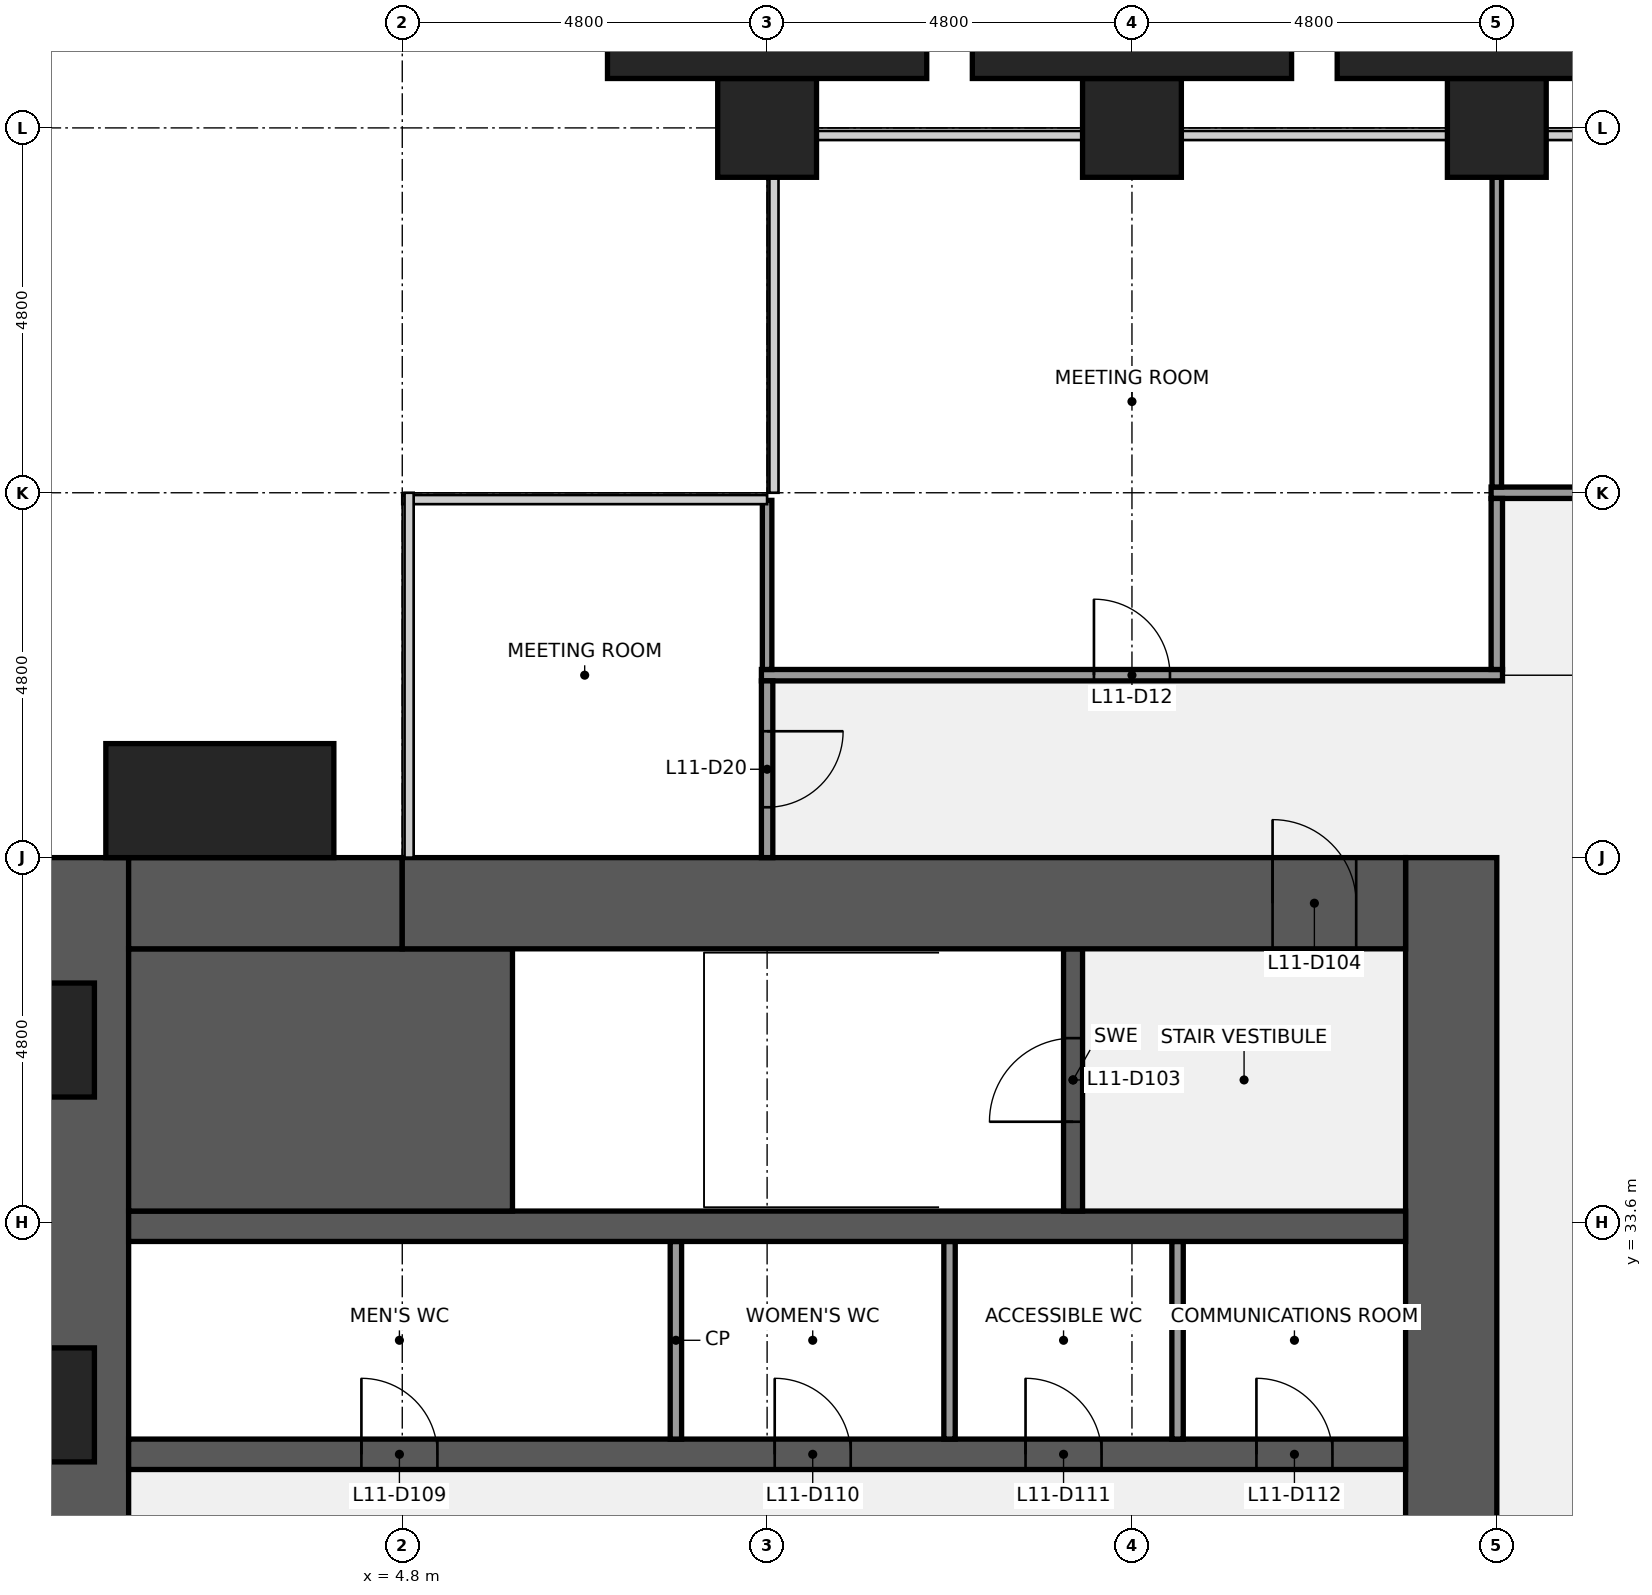
"""IFC4 building model, lengths in metres.
Left out: names, types, materials, properties, quantities, classifications, styles, units other than length and angle.
Written with IfcOpenShell. Run it as: python <this file> out.ifc"""

import sys

from ifc_helpers import new_model, si_unit, direction, frame, frame_2d, origin, origin_2d, place, context, subcontext, project, spatial, rectangle, extrude, element, fill, save


model = new_model("IFC4")
c1 = context("Model", 3, precision=1e-05, world=origin(), true_north=direction((0.0, 1.0)))
c2 = subcontext(c1, "Body", "Model", "MODEL_VIEW")
j1 = project(units=[si_unit("LENGTHUNIT", "METRE"), si_unit("PLANEANGLEUNIT", "RADIAN")], contexts=[c1])
p1 = place(None, origin())
s1 = spatial("IfcSite", under=j1, at=p1, CompositionType="ELEMENT")
p2 = place(p1, origin())
s2 = spatial("IfcBuilding", under=s1, at=p2, CompositionType="ELEMENT")
p3 = place(p2, frame((0.0, 0.0, 55.0)))
s3 = spatial("IfcBuildingStorey", under=s2, at=p3, CompositionType="ELEMENT", Elevation=55.0)
for number, where, z_axis, x_axis in (
    (1, (9.6, 48.0, 0.0), (0.0, 0.0, 1.0), (1.0, 0.0, 0.0)),
    (2, (14.4, 48.0, 0.0), (0.0, 0.0, 1.0), (1.0, 0.0, 0.0)),
    (3, (19.2, 48.0, 0.0), (0.0, 0.0, 1.0), (1.0, 0.0, 0.0)),
):
    element("IfcColumn", number, at=place(p3, frame(where, z_axis=z_axis, x_axis=x_axis)), inside=s3, PredefinedType="COLUMN", context=c2, shape_type="SweptSolid", body=[
        extrude(rectangle(XDim=1.3, YDim=1.3, at=origin_2d()), origin(), (0.0, 0.0, 1.0), 4.0),
    ])
p4 = place(p3, frame((0.6, 9.6, 0.0), z_axis=(0.0, 0.0, 1.0), x_axis=(0.0, 1.0, 0.0)))
e4 = element("IfcWall", 4, at=p4, inside=s3, PredefinedType="SHEAR", context=c2, shape_type="SweptSolid", body=[
    extrude(rectangle(XDim=28.8, YDim=1.2, at=frame_2d((14.4, 0.0))), origin(), (0.0, 0.0, 1.0), 3.84),
])
p5 = place(p4, frame((8.85, 0.0, 0.9)))
e5 = element("IfcOpeningElement", 5, at=p5, cuts=e4, PredefinedType="OPENING", context=c2, shape_type="SweptSolid", body=[
    extrude(rectangle(XDim=1.5, YDim=1.5, at=frame_2d((0.75, 0.75))), frame((0.0, 0.61, 0.0), z_axis=(0.0, -1.0, 0.0), x_axis=(1.0, 0.0, 0.0)), (0.0, 0.0, 1.0), 1.22),
])
p6 = place(p4, frame((18.45, 0.0, 0.9)))
e6 = element("IfcOpeningElement", 6, at=p6, cuts=e4, PredefinedType="OPENING", context=c2, shape_type="SweptSolid", body=[
    extrude(rectangle(XDim=1.5, YDim=1.5, at=frame_2d((0.75, 0.75))), frame((0.0, 0.61, 0.0), z_axis=(0.0, -1.0, 0.0), x_axis=(1.0, 0.0, 0.0)), (0.0, 0.0, 1.0), 1.22),
])
p7 = place(p3, frame((18.6, 38.4, 0.0), z_axis=(0.0, 0.0, 1.0), x_axis=(0.0, -1.0, 0.0)))
e7 = element("IfcWall", 7, at=p7, inside=s3, PredefinedType="SHEAR", context=c2, shape_type="SweptSolid", body=[
    extrude(rectangle(XDim=28.8, YDim=1.2, at=frame_2d((14.4, 0.0))), origin(), (0.0, 0.0, 1.0), 3.84),
])
p8 = place(p7, frame((18.3, 0.0, 0.0)))
e8 = element("IfcOpeningElement", 8, at=p8, cuts=e7, PredefinedType="OPENING", context=c2, shape_type="SweptSolid", body=[
    extrude(rectangle(XDim=1.8, YDim=2.1, at=frame_2d((0.9, 1.05))), frame((0.0, 0.61, 0.0), z_axis=(0.0, -1.0, 0.0), x_axis=(1.0, 0.0, 0.0)), (0.0, 0.0, 1.0), 1.22),
])
p9 = place(p7, frame((8.7, 0.0, 0.0)))
e9 = element("IfcOpeningElement", 9, at=p9, cuts=e7, PredefinedType="OPENING", context=c2, shape_type="SweptSolid", body=[
    extrude(rectangle(XDim=1.8, YDim=2.1, at=frame_2d((0.9, 1.05))), frame((0.0, 0.61, 0.0), z_axis=(0.0, -1.0, 0.0), x_axis=(1.0, 0.0, 0.0)), (0.0, 0.0, 1.0), 1.22),
])
p10 = place(p3, frame((1.2, 30.55, 0.0), z_axis=(0.0, 0.0, 1.0), x_axis=(1.0, 0.0, 0.0)))
e10 = element("IfcWall", 10, at=p10, inside=s3, PredefinedType="SHEAR", context=c2, shape_type="SweptSolid", body=[
    extrude(rectangle(XDim=16.8, YDim=0.4, at=frame_2d((8.4, 0.0))), origin(), (0.0, 0.0, 1.0), 3.84),
])
p11 = place(p10, frame((3.062, 0.0, 0.0)))
e11 = element("IfcOpeningElement", 11, at=p11, cuts=e10, PredefinedType="OPENING", context=c2, shape_type="SweptSolid", body=[
    extrude(rectangle(XDim=1.0, YDim=2.1, at=frame_2d((0.5, 1.05))), frame((0.0, 0.21, 0.0), z_axis=(0.0, -1.0, 0.0), x_axis=(1.0, 0.0, 0.0)), (0.0, 0.0, 1.0), 0.42),
])
p12 = place(p10, frame((8.5, 0.0, 0.0)))
e12 = element("IfcOpeningElement", 12, at=p12, cuts=e10, PredefinedType="OPENING", context=c2, shape_type="SweptSolid", body=[
    extrude(rectangle(XDim=1.0, YDim=2.1, at=frame_2d((0.5, 1.05))), frame((0.0, 0.21, 0.0), z_axis=(0.0, -1.0, 0.0), x_axis=(1.0, 0.0, 0.0)), (0.0, 0.0, 1.0), 0.42),
])
p13 = place(p10, frame((11.8, 0.0, 0.0)))
e13 = element("IfcOpeningElement", 13, at=p13, cuts=e10, PredefinedType="OPENING", context=c2, shape_type="SweptSolid", body=[
    extrude(rectangle(XDim=1.0, YDim=2.1, at=frame_2d((0.5, 1.05))), frame((0.0, 0.21, 0.0), z_axis=(0.0, -1.0, 0.0), x_axis=(1.0, 0.0, 0.0)), (0.0, 0.0, 1.0), 0.42),
])
p14 = place(p10, frame((14.837, 0.0, 0.0)))
e14 = element("IfcOpeningElement", 14, at=p14, cuts=e10, PredefinedType="OPENING", context=c2, shape_type="SweptSolid", body=[
    extrude(rectangle(XDim=1.0, YDim=2.1, at=frame_2d((0.5, 1.05))), frame((0.0, 0.21, 0.0), z_axis=(0.0, -1.0, 0.0), x_axis=(1.0, 0.0, 0.0)), (0.0, 0.0, 1.0), 0.42),
])
for number, where, z_axis, x_axis in (
    (15, (8.4, 30.75, 0.0), (0.0, 0.0, 1.0), (0.0, 1.0, 0.0)),
    (16, (12.0, 30.75, 0.0), (0.0, 0.0, 1.0), (0.0, 1.0, 0.0)),
    (17, (15.0, 30.75, 0.0), (0.0, 0.0, 1.0), (0.0, 1.0, 0.0)),
):
    element("IfcWall", number, at=place(p3, frame(where, z_axis=z_axis, x_axis=x_axis)), inside=s3, PredefinedType="PARTITIONING", context=c2, shape_type="SweptSolid", body=[
        extrude(rectangle(XDim=2.6, YDim=0.15, at=frame_2d((1.3, 0.0))), origin(), (0.0, 0.0, 1.0), 3.84),
    ])
p15 = place(p3, frame((1.2, 33.55, 0.0), z_axis=(0.0, 0.0, 1.0), x_axis=(1.0, 0.0, 0.0)))
e18 = element("IfcWall", 18, at=p15, inside=s3, PredefinedType="SHEAR", context=c2, shape_type="SweptSolid", body=[
    extrude(rectangle(XDim=16.8, YDim=0.4, at=frame_2d((8.4, 0.0))), origin(), (0.0, 0.0, 1.0), 3.84),
])
p16 = place(p3, frame((1.2, 35.475, 0.0), z_axis=(0.0, 0.0, 1.0), x_axis=(1.0, 0.0, 0.0)))
e19 = element("IfcWall", 19, at=p16, inside=s3, PredefinedType="SHEAR", context=c2, shape_type="SweptSolid", body=[
    extrude(rectangle(XDim=5.05, YDim=3.45, at=frame_2d((2.525, 0.0))), origin(), (0.0, 0.0, 1.0), 3.84),
])
p17 = place(p3, frame((13.625, 33.75, 0.0), z_axis=(0.0, 0.0, 1.0), x_axis=(0.0, 1.0, 0.0)))
e20 = element("IfcWall", 20, at=p17, inside=s3, PredefinedType="SHEAR", context=c2, shape_type="SweptSolid", body=[
    extrude(rectangle(XDim=3.45, YDim=0.25, at=frame_2d((1.725, 0.0))), origin(), (0.0, 0.0, 1.0), 3.84),
])
p18 = place(p17, frame((1.175, 0.0, 0.0)))
e21 = element("IfcOpeningElement", 21, at=p18, cuts=e20, PredefinedType="OPENING", context=c2, shape_type="SweptSolid", body=[
    extrude(rectangle(XDim=1.1, YDim=2.1, at=frame_2d((0.55, 1.05))), frame((0.0, 0.135, 0.0), z_axis=(0.0, -1.0, 0.0), x_axis=(1.0, 0.0, 0.0)), (0.0, 0.0, 1.0), 0.27),
])
p19 = place(p3, frame((1.2, 37.8, 0.0), z_axis=(0.0, 0.0, 1.0), x_axis=(1.0, 0.0, 0.0)))
e22 = element("IfcWall", 22, at=p19, inside=s3, PredefinedType="SHEAR", context=c2, shape_type="SweptSolid", body=[
    extrude(rectangle(XDim=3.6, YDim=1.2, at=frame_2d((1.8, 0.0))), origin(), (0.0, 0.0, 1.0), 3.84),
])
p20 = place(p3, frame((4.8, 37.8, 0.0), z_axis=(0.0, 0.0, 1.0), x_axis=(1.0, 0.0, 0.0)))
e23 = element("IfcWall", 23, at=p20, inside=s3, PredefinedType="SHEAR", context=c2, shape_type="SweptSolid", body=[
    extrude(rectangle(XDim=13.2, YDim=1.2, at=frame_2d((6.6, 0.0))), origin(), (0.0, 0.0, 1.0), 3.84),
])
p21 = place(p20, frame((11.45, 0.0, 0.0)))
e24 = element("IfcOpeningElement", 24, at=p21, cuts=e23, PredefinedType="OPENING", context=c2, shape_type="SweptSolid", body=[
    extrude(rectangle(XDim=1.1, YDim=2.1, at=frame_2d((0.55, 1.05))), frame((0.0, 0.61, 0.0), z_axis=(0.0, -1.0, 0.0), x_axis=(1.0, 0.0, 0.0)), (0.0, 0.0, 1.0), 1.22),
])
p22 = place(p3, frame((9.525, 40.8, 0.0), z_axis=(0.0, 0.0, 1.0), x_axis=(1.0, 0.0, 0.0)))
e25 = element("IfcWall", 25, at=p22, inside=s3, PredefinedType="PARTITIONING", context=c2, shape_type="SweptSolid", body=[
    extrude(rectangle(XDim=9.75, YDim=0.15, at=frame_2d((4.875, 0.0))), origin(), (0.0, 0.0, 1.0), 2.849),
])
p23 = place(p22, frame((4.375, 0.0, 0.0)))
e26 = element("IfcOpeningElement", 26, at=p23, cuts=e25, PredefinedType="OPENING", context=c2, shape_type="SweptSolid", body=[
    extrude(rectangle(XDim=1.0, YDim=2.1, at=frame_2d((0.5, 1.05))), frame((0.0, 0.085, 0.0), z_axis=(0.0, -1.0, 0.0), x_axis=(1.0, 0.0, 0.0)), (0.0, 0.0, 1.0), 0.17),
])
p24 = place(p3, frame((19.125, 43.2, 0.0), z_axis=(0.0, 0.0, 1.0), x_axis=(1.0, 0.0, 0.0)))
e27 = element("IfcWall", 27, at=p24, inside=s3, PredefinedType="PARTITIONING", context=c2, shape_type="SweptSolid", body=[
    extrude(rectangle(XDim=19.35, YDim=0.15, at=frame_2d((9.675, 0.0))), origin(), (0.0, 0.0, 1.0), 2.849),
])
p25 = place(p24, frame((4.375, 0.0, 0.0)))
e28 = element("IfcOpeningElement", 28, at=p25, cuts=e27, PredefinedType="OPENING", context=c2, shape_type="SweptSolid", body=[
    extrude(rectangle(XDim=1.0, YDim=2.1, at=frame_2d((0.5, 1.05))), frame((0.0, 0.085, 0.0), z_axis=(0.0, -1.0, 0.0), x_axis=(1.0, 0.0, 0.0)), (0.0, 0.0, 1.0), 0.17),
])
p26 = place(p24, frame((10.375, 0.0, 0.0)))
e29 = element("IfcOpeningElement", 29, at=p26, cuts=e27, PredefinedType="OPENING", context=c2, shape_type="SweptSolid", body=[
    extrude(rectangle(XDim=1.0, YDim=2.1, at=frame_2d((0.5, 1.05))), frame((0.0, 0.085, 0.0), z_axis=(0.0, -1.0, 0.0), x_axis=(1.0, 0.0, 0.0)), (0.0, 0.0, 1.0), 0.17),
])
p27 = place(p24, frame((15.175, 0.0, 0.0)))
e30 = element("IfcOpeningElement", 30, at=p27, cuts=e27, PredefinedType="OPENING", context=c2, shape_type="SweptSolid", body=[
    extrude(rectangle(XDim=1.0, YDim=2.1, at=frame_2d((0.5, 1.05))), frame((0.0, 0.085, 0.0), z_axis=(0.0, -1.0, 0.0), x_axis=(1.0, 0.0, 0.0)), (0.0, 0.0, 1.0), 0.17),
])
p28 = place(p3, frame((9.6, 40.875, 0.0), z_axis=(0.0, 0.0, 1.0), x_axis=(0.0, 1.0, 0.0)))
e31 = element("IfcWall", 31, at=p28, inside=s3, PredefinedType="PARTITIONING", context=c2, shape_type="SweptSolid", body=[
    extrude(rectangle(XDim=2.225, YDim=0.125, at=frame_2d((1.113, 0.0))), origin(), (0.0, 0.0, 1.0), 2.849),
])
p29 = place(p3, frame((9.6, 38.4, 0.0), z_axis=(0.0, 0.0, 1.0), x_axis=(0.0, 1.0, 0.0)))
e32 = element("IfcWall", 32, at=p29, inside=s3, PredefinedType="PARTITIONING", context=c2, shape_type="SweptSolid", body=[
    extrude(rectangle(XDim=2.325, YDim=0.15, at=frame_2d((1.163, 0.0))), origin(), (0.0, 0.0, 1.0), 2.849),
])
p30 = place(p29, frame((0.663, 0.0, 0.0)))
e33 = element("IfcOpeningElement", 33, at=p30, cuts=e32, PredefinedType="OPENING", context=c2, shape_type="SweptSolid", body=[
    extrude(rectangle(XDim=1.0, YDim=2.1, at=frame_2d((0.5, 1.05))), frame((0.0, 0.085, 0.0), z_axis=(0.0, -1.0, 0.0), x_axis=(1.0, 0.0, 0.0)), (0.0, 0.0, 1.0), 0.17),
])
p31 = place(p3, frame((19.2, 43.275, 0.0), z_axis=(0.0, 0.0, 1.0), x_axis=(0.0, 1.0, 0.0)))
e34 = element("IfcWall", 34, at=p31, inside=s3, PredefinedType="PARTITIONING", context=c2, shape_type="SweptSolid", body=[
    extrude(rectangle(XDim=4.075, YDim=0.125, at=frame_2d((2.038, 0.0))), origin(), (0.0, 0.0, 1.0), 2.849),
])
p32 = place(p3, frame((19.2, 40.875, 0.0), z_axis=(0.0, 0.0, 1.0), x_axis=(0.0, 1.0, 0.0)))
e35 = element("IfcWall", 35, at=p32, inside=s3, PredefinedType="PARTITIONING", context=c2, shape_type="SweptSolid", body=[
    extrude(rectangle(XDim=2.25, YDim=0.15, at=frame_2d((1.125, 0.0))), origin(), (0.0, 0.0, 1.0), 2.849),
])
p33 = place(p3, frame((2.4, 39.15, 0.0), z_axis=(0.0, 0.0, 1.0), x_axis=(1.0, 0.0, 0.0)))
e36 = element("IfcColumn", 36, at=p33, inside=s3, PredefinedType="PILASTER", context=c2, shape_type="SweptSolid", body=[
    extrude(rectangle(XDim=3.0, YDim=1.5, at=origin_2d()), origin(), (0.0, 0.0, 1.0), 4.0),
])
for number, where, z_axis, x_axis in (
    (37, (9.6, 49.075, 0.0), (0.0, 0.0, 1.0), (1.0, 0.0, 0.0)),
    (38, (14.4, 49.075, 0.0), (0.0, 0.0, 1.0), (1.0, 0.0, 0.0)),
    (39, (19.2, 49.075, 0.0), (0.0, 0.0, 1.0), (1.0, 0.0, 0.0)),
):
    element("IfcColumn", number, at=place(p3, frame(where, z_axis=z_axis, x_axis=x_axis)), inside=s3, PredefinedType="PILASTER", context=c2, shape_type="SweptSolid", body=[
        extrude(rectangle(XDim=4.2, YDim=0.85, at=origin_2d()), origin(), (0.0, 0.0, 1.0), 4.0),
    ])
p34 = place(p18, origin())
e40 = element("IfcDoor", 40, at=p34, inside=s3, OperationType="SINGLE_SWING_LEFT", PredefinedType="DOOR", context=c2, shape_type="SweptSolid", body=[
    extrude(rectangle(XDim=1.1, YDim=2.1, at=frame_2d((0.55, 1.05))), frame((0.0, 0.025, 0.0), z_axis=(0.0, -1.0, 0.0), x_axis=(1.0, 0.0, 0.0)), (0.0, 0.0, 1.0), 0.05),
])
fill(e21, e40)
p35 = place(p21, origin())
e41 = element("IfcDoor", 41, at=p35, inside=s3, OperationType="SINGLE_SWING_LEFT", PredefinedType="DOOR", context=c2, shape_type="SweptSolid", body=[
    extrude(rectangle(XDim=1.1, YDim=2.1, at=frame_2d((0.55, 1.05))), frame((0.0, 0.025, 0.0), z_axis=(0.0, -1.0, 0.0), x_axis=(1.0, 0.0, 0.0)), (0.0, 0.0, 1.0), 0.05),
])
fill(e24, e41)
p36 = place(p11, origin())
e42 = element("IfcDoor", 42, at=p36, inside=s3, OperationType="SINGLE_SWING_LEFT", PredefinedType="DOOR", context=c2, shape_type="SweptSolid", body=[
    extrude(rectangle(XDim=1.0, YDim=2.1, at=frame_2d((0.5, 1.05))), frame((0.0, 0.025, 0.0), z_axis=(0.0, -1.0, 0.0), x_axis=(1.0, 0.0, 0.0)), (0.0, 0.0, 1.0), 0.05),
])
fill(e11, e42)
p37 = place(p12, origin())
e43 = element("IfcDoor", 43, at=p37, inside=s3, OperationType="SINGLE_SWING_LEFT", PredefinedType="DOOR", context=c2, shape_type="SweptSolid", body=[
    extrude(rectangle(XDim=1.0, YDim=2.1, at=frame_2d((0.5, 1.05))), frame((0.0, 0.025, 0.0), z_axis=(0.0, -1.0, 0.0), x_axis=(1.0, 0.0, 0.0)), (0.0, 0.0, 1.0), 0.05),
])
fill(e12, e43)
p38 = place(p13, origin())
e44 = element("IfcDoor", 44, at=p38, inside=s3, OperationType="SINGLE_SWING_LEFT", PredefinedType="DOOR", context=c2, shape_type="SweptSolid", body=[
    extrude(rectangle(XDim=1.0, YDim=2.1, at=frame_2d((0.5, 1.05))), frame((0.0, 0.025, 0.0), z_axis=(0.0, -1.0, 0.0), x_axis=(1.0, 0.0, 0.0)), (0.0, 0.0, 1.0), 0.05),
])
fill(e13, e44)
p39 = place(p14, origin())
e45 = element("IfcDoor", 45, at=p39, inside=s3, OperationType="SINGLE_SWING_LEFT", PredefinedType="DOOR", context=c2, shape_type="SweptSolid", body=[
    extrude(rectangle(XDim=1.0, YDim=2.1, at=frame_2d((0.5, 1.05))), frame((0.0, 0.025, 0.0), z_axis=(0.0, -1.0, 0.0), x_axis=(1.0, 0.0, 0.0)), (0.0, 0.0, 1.0), 0.05),
])
fill(e14, e45)
p40 = place(p23, origin())
e46 = element("IfcDoor", 46, at=p40, inside=s3, OperationType="SINGLE_SWING_LEFT", PredefinedType="DOOR", context=c2, shape_type="SweptSolid", body=[
    extrude(rectangle(XDim=1.0, YDim=2.1, at=frame_2d((0.5, 1.05))), frame((0.0, 0.025, 0.0), z_axis=(0.0, -1.0, 0.0), x_axis=(1.0, 0.0, 0.0)), (0.0, 0.0, 1.0), 0.05),
])
fill(e26, e46)
p41 = place(p30, origin())
e47 = element("IfcDoor", 47, at=p41, inside=s3, OperationType="SINGLE_SWING_RIGHT", PredefinedType="DOOR", context=c2, shape_type="SweptSolid", body=[
    extrude(rectangle(XDim=1.0, YDim=2.1, at=frame_2d((0.5, 1.05))), frame((0.0, 0.025, 0.0), z_axis=(0.0, -1.0, 0.0), x_axis=(1.0, 0.0, 0.0)), (0.0, 0.0, 1.0), 0.05),
])
fill(e33, e47)
save(model, sys.argv[1])
